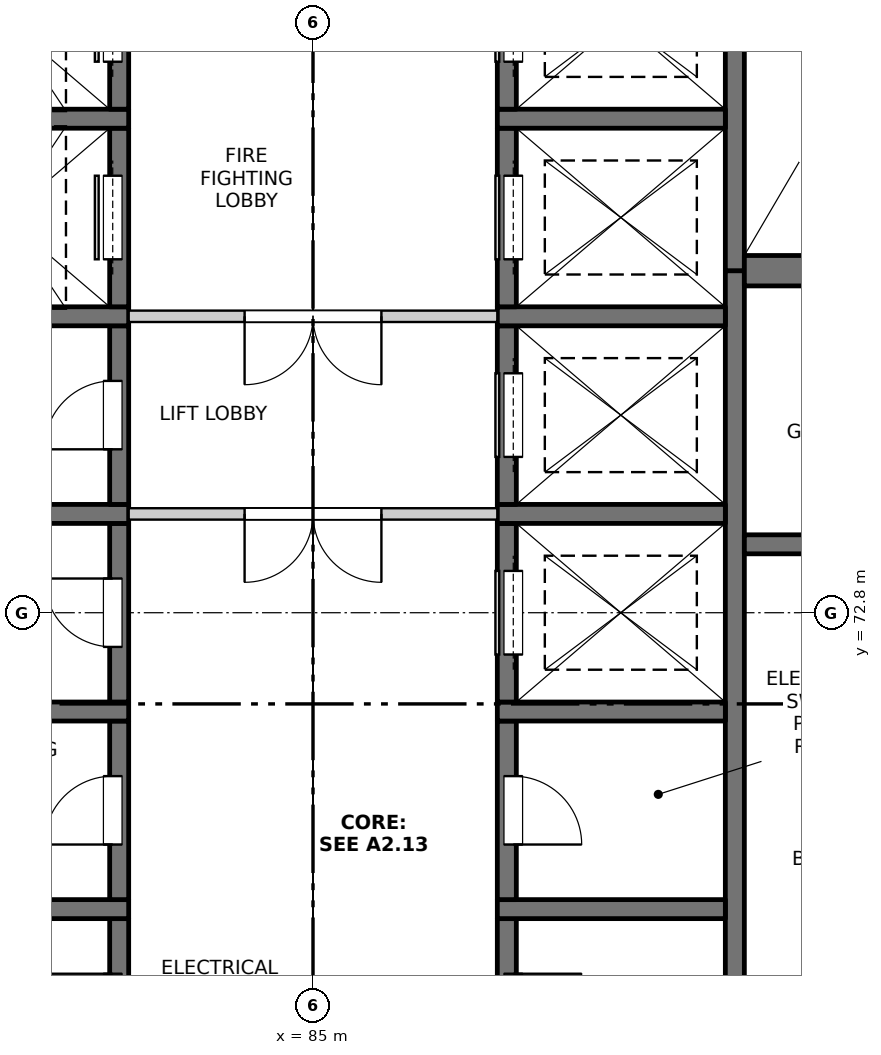
"""IFC4 building model, lengths in metres.
Left out: names, types, materials, properties, quantities, classifications, styles, units other than length and angle.
Written with IfcOpenShell. Run it as: python <this file> out.ifc"""

import sys

from ifc_helpers import new_model, si_unit, direction, frame, frame_2d, origin, place, context, subcontext, project, spatial, rectangle, extrude, element, fill, save


model = new_model("IFC4")
c1 = context("Model", 3, precision=1e-05, world=origin(), true_north=direction((0.0, 1.0)))
c2 = subcontext(c1, "Body", "Model", "MODEL_VIEW")
j1 = project(units=[si_unit("LENGTHUNIT", "METRE"), si_unit("PLANEANGLEUNIT", "RADIAN")], contexts=[c1])
p1 = place(None, origin())
s1 = spatial("IfcSite", under=j1, at=p1, CompositionType="ELEMENT")
p2 = place(p1, origin())
s2 = spatial("IfcBuilding", under=s1, at=p2, CompositionType="ELEMENT")
p3 = place(p2, frame((0.0, 0.0, 266.4)))
s3 = spatial("IfcBuildingStorey", under=s2, at=p3, CompositionType="ELEMENT", Elevation=266.4)
p4 = place(p3, frame((90.55, 61.95, -0.3), z_axis=(0.0, 0.0, 1.0), x_axis=(0.0, 1.0, 0.0)))
e1 = element("IfcWall", 1, at=p4, inside=s3, PredefinedType="SOLIDWALL", context=c2, shape_type="SweptSolid", body=[
    extrude(rectangle(XDim=15.35, YDim=0.25, at=frame_2d((7.675, 0.0))), origin(), (0.0, 0.0, 1.0), 6.0),
])
p5 = place(p3, frame((90.55, 77.3, -0.3), z_axis=(0.0, 0.0, 1.0), x_axis=(0.0, 1.0, 0.0)))
e2 = element("IfcWall", 2, at=p5, inside=s3, PredefinedType="SOLIDWALL", context=c2, shape_type="SweptSolid", body=[
    extrude(rectangle(XDim=7.0, YDim=0.25, at=frame_2d((3.5, 0.0))), origin(), (0.0, 0.0, 1.0), 6.0),
])
p6 = place(p3, frame((82.45, 66.425, -0.3), z_axis=(0.0, 0.0, 1.0), x_axis=(0.0, 1.0, 0.0)))
e3 = element("IfcWall", 3, at=p6, inside=s3, PredefinedType="SOLIDWALL", context=c2, shape_type="SweptSolid", body=[
    extrude(rectangle(XDim=2.35, YDim=0.25, at=frame_2d((1.175, 0.0))), origin(), (0.0, 0.0, 1.0), 6.0),
])
p7 = place(p6, frame((0.725, 0.0, 0.3)))
e4 = element("IfcOpeningElement", 4, at=p7, cuts=e3, PredefinedType="OPENING", context=c2, shape_type="SweptSolid", body=[
    extrude(rectangle(XDim=0.9, YDim=2.1, at=frame_2d((0.45, 1.05))), frame((0.0, 0.135, 0.0), z_axis=(0.0, -1.0, 0.0), x_axis=(1.0, 0.0, 0.0)), (0.0, 0.0, 1.0), 0.27),
])
p8 = place(p3, frame((79.575, 68.9, -0.3), z_axis=(0.0, 0.0, 1.0), x_axis=(1.0, 0.0, 0.0)))
e5 = element("IfcWall", 5, at=p8, inside=s3, PredefinedType="SOLIDWALL", context=c2, shape_type="SweptSolid", body=[
    extrude(rectangle(XDim=3.0, YDim=0.25, at=frame_2d((1.5, 0.0))), origin(), (0.0, 0.0, 1.0), 6.0),
])
p9 = place(p3, frame((82.45, 69.025, -0.3), z_axis=(0.0, 0.0, 1.0), x_axis=(0.0, 1.0, 0.0)))
e6 = element("IfcWall", 6, at=p9, inside=s3, PredefinedType="SOLIDWALL", context=c2, shape_type="SweptSolid", body=[
    extrude(rectangle(XDim=2.35, YDim=0.25, at=frame_2d((1.175, 0.0))), origin(), (0.0, 0.0, 1.0), 6.0),
])
p10 = place(p9, frame((0.725, 0.0, 0.3)))
e7 = element("IfcOpeningElement", 7, at=p10, cuts=e6, PredefinedType="OPENING", context=c2, shape_type="SweptSolid", body=[
    extrude(rectangle(XDim=0.9, YDim=2.1, at=frame_2d((0.45, 1.05))), frame((0.0, 0.135, 0.0), z_axis=(0.0, -1.0, 0.0), x_axis=(1.0, 0.0, 0.0)), (0.0, 0.0, 1.0), 0.27),
])
p11 = place(p3, frame((79.575, 71.5, -0.3), z_axis=(0.0, 0.0, 1.0), x_axis=(1.0, 0.0, 0.0)))
e8 = element("IfcWall", 8, at=p11, inside=s3, PredefinedType="SOLIDWALL", context=c2, shape_type="SweptSolid", body=[
    extrude(rectangle(XDim=3.0, YDim=0.25, at=frame_2d((1.5, 0.0))), origin(), (0.0, 0.0, 1.0), 6.0),
])
p12 = place(p3, frame((82.45, 71.625, -0.3), z_axis=(0.0, 0.0, 1.0), x_axis=(0.0, 1.0, 0.0)))
e9 = element("IfcWall", 9, at=p12, inside=s3, PredefinedType="SOLIDWALL", context=c2, shape_type="SweptSolid", body=[
    extrude(rectangle(XDim=2.35, YDim=0.25, at=frame_2d((1.175, 0.0))), origin(), (0.0, 0.0, 1.0), 6.0),
])
p13 = place(p12, frame((0.725, 0.0, 0.3)))
e10 = element("IfcOpeningElement", 10, at=p13, cuts=e9, PredefinedType="OPENING", context=c2, shape_type="SweptSolid", body=[
    extrude(rectangle(XDim=0.9, YDim=2.1, at=frame_2d((0.45, 1.05))), frame((0.0, 0.135, 0.0), z_axis=(0.0, -1.0, 0.0), x_axis=(1.0, 0.0, 0.0)), (0.0, 0.0, 1.0), 0.27),
])
p14 = place(p3, frame((79.575, 74.1, -0.3), z_axis=(0.0, 0.0, 1.0), x_axis=(1.0, 0.0, 0.0)))
e11 = element("IfcWall", 11, at=p14, inside=s3, PredefinedType="SOLIDWALL", context=c2, shape_type="SweptSolid", body=[
    extrude(rectangle(XDim=3.0, YDim=0.25, at=frame_2d((1.5, 0.0))), origin(), (0.0, 0.0, 1.0), 6.0),
])
p15 = place(p3, frame((82.45, 74.225, -0.3), z_axis=(0.0, 0.0, 1.0), x_axis=(0.0, 1.0, 0.0)))
e12 = element("IfcWall", 12, at=p15, inside=s3, PredefinedType="SOLIDWALL", context=c2, shape_type="SweptSolid", body=[
    extrude(rectangle(XDim=2.35, YDim=0.25, at=frame_2d((1.175, 0.0))), origin(), (0.0, 0.0, 1.0), 6.0),
])
p16 = place(p15, frame((0.725, 0.0, 0.3)))
e13 = element("IfcOpeningElement", 13, at=p16, cuts=e12, PredefinedType="OPENING", context=c2, shape_type="SweptSolid", body=[
    extrude(rectangle(XDim=0.9, YDim=2.1, at=frame_2d((0.45, 1.05))), frame((0.0, 0.135, 0.0), z_axis=(0.0, -1.0, 0.0), x_axis=(1.0, 0.0, 0.0)), (0.0, 0.0, 1.0), 0.27),
])
p17 = place(p3, frame((79.575, 76.7, -0.3), z_axis=(0.0, 0.0, 1.0), x_axis=(1.0, 0.0, 0.0)))
e14 = element("IfcWall", 14, at=p17, inside=s3, PredefinedType="SOLIDWALL", context=c2, shape_type="SweptSolid", body=[
    extrude(rectangle(XDim=3.0, YDim=0.25, at=frame_2d((1.5, 0.0))), origin(), (0.0, 0.0, 1.0), 6.0),
])
p18 = place(p3, frame((82.45, 76.825, -0.3), z_axis=(0.0, 0.0, 1.0), x_axis=(0.0, 1.0, 0.0)))
e15 = element("IfcWall", 15, at=p18, inside=s3, PredefinedType="SOLIDWALL", context=c2, shape_type="SweptSolid", body=[
    extrude(rectangle(XDim=2.35, YDim=0.25, at=frame_2d((1.175, 0.0))), origin(), (0.0, 0.0, 1.0), 6.0),
])
p19 = place(p18, frame((0.625, 0.0, 0.3)))
e16 = element("IfcOpeningElement", 16, at=p19, cuts=e15, PredefinedType="OPENING", context=c2, shape_type="SweptSolid", body=[
    extrude(rectangle(XDim=1.1, YDim=2.1, at=frame_2d((0.55, 1.05))), frame((0.0, 0.135, 0.0), z_axis=(0.0, -1.0, 0.0), x_axis=(1.0, 0.0, 0.0)), (0.0, 0.0, 1.0), 0.27),
])
p20 = place(p3, frame((79.575, 79.3, -0.3), z_axis=(0.0, 0.0, 1.0), x_axis=(1.0, 0.0, 0.0)))
e17 = element("IfcWall", 17, at=p20, inside=s3, PredefinedType="SOLIDWALL", context=c2, shape_type="SweptSolid", body=[
    extrude(rectangle(XDim=3.0, YDim=0.25, at=frame_2d((1.5, 0.0))), origin(), (0.0, 0.0, 1.0), 6.0),
])
p21 = place(p3, frame((82.45, 79.425, -0.3), z_axis=(0.0, 0.0, 1.0), x_axis=(0.0, 1.0, 0.0)))
e18 = element("IfcWall", 18, at=p21, inside=s3, PredefinedType="SOLIDWALL", context=c2, shape_type="SweptSolid", body=[
    extrude(rectangle(XDim=2.35, YDim=0.25, at=frame_2d((1.175, 0.0))), origin(), (0.0, 0.0, 1.0), 6.0),
])
p22 = place(p21, frame((0.625, 0.0, 0.3)))
e19 = element("IfcOpeningElement", 19, at=p22, cuts=e18, PredefinedType="OPENING", context=c2, shape_type="SweptSolid", body=[
    extrude(rectangle(XDim=1.1, YDim=2.1, at=frame_2d((0.55, 1.05))), frame((0.0, 0.135, 0.0), z_axis=(0.0, -1.0, 0.0), x_axis=(1.0, 0.0, 0.0)), (0.0, 0.0, 1.0), 0.27),
])
p23 = place(p3, frame((87.55, 66.425, -0.3), z_axis=(0.0, 0.0, 1.0), x_axis=(0.0, 1.0, 0.0)))
e20 = element("IfcWall", 20, at=p23, inside=s3, PredefinedType="SOLIDWALL", context=c2, shape_type="SweptSolid", body=[
    extrude(rectangle(XDim=2.35, YDim=0.25, at=frame_2d((1.175, 0.0))), origin(), (0.0, 0.0, 1.0), 6.0),
])
p24 = place(p23, frame((0.725, 0.0, 0.3)))
e21 = element("IfcOpeningElement", 21, at=p24, cuts=e20, PredefinedType="OPENING", context=c2, shape_type="SweptSolid", body=[
    extrude(rectangle(XDim=0.9, YDim=2.1, at=frame_2d((0.45, 1.05))), frame((0.0, 0.135, 0.0), z_axis=(0.0, -1.0, 0.0), x_axis=(1.0, 0.0, 0.0)), (0.0, 0.0, 1.0), 0.27),
])
p25 = place(p3, frame((87.425, 68.9, -0.3), z_axis=(0.0, 0.0, 1.0), x_axis=(1.0, 0.0, 0.0)))
e22 = element("IfcWall", 22, at=p25, inside=s3, PredefinedType="SOLIDWALL", context=c2, shape_type="SweptSolid", body=[
    extrude(rectangle(XDim=3.0, YDim=0.25, at=frame_2d((1.5, 0.0))), origin(), (0.0, 0.0, 1.0), 6.0),
])
p26 = place(p3, frame((87.55, 69.025, -0.3), z_axis=(0.0, 0.0, 1.0), x_axis=(0.0, 1.0, 0.0)))
e23 = element("IfcWall", 23, at=p26, inside=s3, PredefinedType="SOLIDWALL", context=c2, shape_type="SweptSolid", body=[
    extrude(rectangle(XDim=2.35, YDim=0.25, at=frame_2d((1.175, 0.0))), origin(), (0.0, 0.0, 1.0), 6.0),
])
p27 = place(p26, frame((0.725, 0.0, 0.3)))
e24 = element("IfcOpeningElement", 24, at=p27, cuts=e23, PredefinedType="OPENING", context=c2, shape_type="SweptSolid", body=[
    extrude(rectangle(XDim=0.9, YDim=2.1, at=frame_2d((0.45, 1.05))), frame((0.0, 0.135, 0.0), z_axis=(0.0, -1.0, 0.0), x_axis=(1.0, 0.0, 0.0)), (0.0, 0.0, 1.0), 0.27),
])
p28 = place(p3, frame((87.425, 71.5, -0.3), z_axis=(0.0, 0.0, 1.0), x_axis=(1.0, 0.0, 0.0)))
e25 = element("IfcWall", 25, at=p28, inside=s3, PredefinedType="SOLIDWALL", context=c2, shape_type="SweptSolid", body=[
    extrude(rectangle(XDim=3.0, YDim=0.25, at=frame_2d((1.5, 0.0))), origin(), (0.0, 0.0, 1.0), 6.0),
])
p29 = place(p3, frame((87.55, 71.625, -0.3), z_axis=(0.0, 0.0, 1.0), x_axis=(0.0, 1.0, 0.0)))
e26 = element("IfcWall", 26, at=p29, inside=s3, PredefinedType="SOLIDWALL", context=c2, shape_type="SweptSolid", body=[
    extrude(rectangle(XDim=2.35, YDim=0.25, at=frame_2d((1.175, 0.0))), origin(), (0.0, 0.0, 1.0), 6.0),
])
p30 = place(p29, frame((0.625, 0.0, 0.3)))
e27 = element("IfcOpeningElement", 27, at=p30, cuts=e26, PredefinedType="OPENING", context=c2, shape_type="SweptSolid", body=[
    extrude(rectangle(XDim=1.1, YDim=2.1, at=frame_2d((0.55, 1.05))), frame((0.0, 0.135, 0.0), z_axis=(0.0, -1.0, 0.0), x_axis=(1.0, 0.0, 0.0)), (0.0, 0.0, 1.0), 0.27),
])
p31 = place(p3, frame((87.425, 74.1, -0.3), z_axis=(0.0, 0.0, 1.0), x_axis=(1.0, 0.0, 0.0)))
e28 = element("IfcWall", 28, at=p31, inside=s3, PredefinedType="SOLIDWALL", context=c2, shape_type="SweptSolid", body=[
    extrude(rectangle(XDim=3.0, YDim=0.25, at=frame_2d((1.5, 0.0))), origin(), (0.0, 0.0, 1.0), 6.0),
])
p32 = place(p3, frame((87.55, 74.225, -0.3), z_axis=(0.0, 0.0, 1.0), x_axis=(0.0, 1.0, 0.0)))
e29 = element("IfcWall", 29, at=p32, inside=s3, PredefinedType="SOLIDWALL", context=c2, shape_type="SweptSolid", body=[
    extrude(rectangle(XDim=2.35, YDim=0.25, at=frame_2d((1.175, 0.0))), origin(), (0.0, 0.0, 1.0), 6.0),
])
p33 = place(p32, frame((0.625, 0.0, 0.3)))
e30 = element("IfcOpeningElement", 30, at=p33, cuts=e29, PredefinedType="OPENING", context=c2, shape_type="SweptSolid", body=[
    extrude(rectangle(XDim=1.1, YDim=2.1, at=frame_2d((0.55, 1.05))), frame((0.0, 0.135, 0.0), z_axis=(0.0, -1.0, 0.0), x_axis=(1.0, 0.0, 0.0)), (0.0, 0.0, 1.0), 0.27),
])
p34 = place(p3, frame((87.425, 76.7, -0.3), z_axis=(0.0, 0.0, 1.0), x_axis=(1.0, 0.0, 0.0)))
e31 = element("IfcWall", 31, at=p34, inside=s3, PredefinedType="SOLIDWALL", context=c2, shape_type="SweptSolid", body=[
    extrude(rectangle(XDim=3.0, YDim=0.25, at=frame_2d((1.5, 0.0))), origin(), (0.0, 0.0, 1.0), 6.0),
])
p35 = place(p3, frame((87.55, 76.825, -0.3), z_axis=(0.0, 0.0, 1.0), x_axis=(0.0, 1.0, 0.0)))
e32 = element("IfcWall", 32, at=p35, inside=s3, PredefinedType="SOLIDWALL", context=c2, shape_type="SweptSolid", body=[
    extrude(rectangle(XDim=2.35, YDim=0.25, at=frame_2d((1.175, 0.0))), origin(), (0.0, 0.0, 1.0), 6.0),
])
p36 = place(p35, frame((0.625, 0.0, 0.3)))
e33 = element("IfcOpeningElement", 33, at=p36, cuts=e32, PredefinedType="OPENING", context=c2, shape_type="SweptSolid", body=[
    extrude(rectangle(XDim=1.1, YDim=2.1, at=frame_2d((0.55, 1.05))), frame((0.0, 0.135, 0.0), z_axis=(0.0, -1.0, 0.0), x_axis=(1.0, 0.0, 0.0)), (0.0, 0.0, 1.0), 0.27),
])
p37 = place(p3, frame((87.425, 79.3, -0.3), z_axis=(0.0, 0.0, 1.0), x_axis=(1.0, 0.0, 0.0)))
e34 = element("IfcWall", 34, at=p37, inside=s3, PredefinedType="SOLIDWALL", context=c2, shape_type="SweptSolid", body=[
    extrude(rectangle(XDim=3.0, YDim=0.25, at=frame_2d((1.5, 0.0))), origin(), (0.0, 0.0, 1.0), 6.0),
])
p38 = place(p3, frame((87.55, 79.425, -0.3), z_axis=(0.0, 0.0, 1.0), x_axis=(0.0, 1.0, 0.0)))
e35 = element("IfcWall", 35, at=p38, inside=s3, PredefinedType="SOLIDWALL", context=c2, shape_type="SweptSolid", body=[
    extrude(rectangle(XDim=2.35, YDim=0.25, at=frame_2d((1.175, 0.0))), origin(), (0.0, 0.0, 1.0), 6.0),
])
p39 = place(p38, frame((0.625, 0.0, 0.3)))
e36 = element("IfcOpeningElement", 36, at=p39, cuts=e35, PredefinedType="OPENING", context=c2, shape_type="SweptSolid", body=[
    extrude(rectangle(XDim=1.1, YDim=2.1, at=frame_2d((0.55, 1.05))), frame((0.0, 0.135, 0.0), z_axis=(0.0, -1.0, 0.0), x_axis=(1.0, 0.0, 0.0)), (0.0, 0.0, 1.0), 0.27),
])
p40 = place(p3, frame((90.675, 73.7, -0.3), z_axis=(0.0, 0.0, 1.0), x_axis=(1.0, 0.0, 0.0)))
e37 = element("IfcWall", 37, at=p40, inside=s3, PredefinedType="SOLIDWALL", context=c2, shape_type="SweptSolid", body=[
    extrude(rectangle(XDim=3.875, YDim=0.25, at=frame_2d((1.938, 0.0))), origin(), (0.0, 0.0, 1.0), 6.0),
])
p41 = place(p3, frame((90.675, 77.3, -0.3), z_axis=(0.0, 0.0, 1.0), x_axis=(1.0, 0.0, 0.0)))
e38 = element("IfcWall", 38, at=p41, inside=s3, PredefinedType="SOLIDWALL", context=c2, shape_type="SweptSolid", body=[
    extrude(rectangle(XDim=3.875, YDim=0.4, at=frame_2d((1.938, 0.0))), origin(), (0.0, 0.0, 1.0), 6.0),
])
p42 = place(p3, frame((82.575, 74.1, 0.0), z_axis=(0.0, 0.0, 1.0), x_axis=(1.0, 0.0, 0.0)))
e39 = element("IfcWall", 39, at=p42, inside=s3, PredefinedType="PARTITIONING", context=c2, shape_type="SweptSolid", body=[
    extrude(rectangle(XDim=4.85, YDim=0.15, at=frame_2d((2.425, 0.0))), origin(), (0.0, 0.0, 1.0), 5.7),
])
p43 = place(p42, frame((1.525, 0.0, 0.0)))
e40 = element("IfcOpeningElement", 40, at=p43, cuts=e39, PredefinedType="OPENING", context=c2, shape_type="SweptSolid", body=[
    extrude(rectangle(XDim=1.8, YDim=2.1, at=frame_2d((0.9, 1.05))), frame((0.0, 0.085, 0.0), z_axis=(0.0, -1.0, 0.0), x_axis=(1.0, 0.0, 0.0)), (0.0, 0.0, 1.0), 0.17),
])
p44 = place(p3, frame((82.575, 76.7, 0.0), z_axis=(0.0, 0.0, 1.0), x_axis=(1.0, 0.0, 0.0)))
e41 = element("IfcWall", 41, at=p44, inside=s3, PredefinedType="PARTITIONING", context=c2, shape_type="SweptSolid", body=[
    extrude(rectangle(XDim=4.85, YDim=0.15, at=frame_2d((2.425, 0.0))), origin(), (0.0, 0.0, 1.0), 5.7),
])
p45 = place(p44, frame((1.525, 0.0, 0.0)))
e42 = element("IfcOpeningElement", 42, at=p45, cuts=e41, PredefinedType="OPENING", context=c2, shape_type="SweptSolid", body=[
    extrude(rectangle(XDim=1.8, YDim=2.1, at=frame_2d((0.9, 1.05))), frame((0.0, 0.085, 0.0), z_axis=(0.0, -1.0, 0.0), x_axis=(1.0, 0.0, 0.0)), (0.0, 0.0, 1.0), 0.17),
])
p46 = place(p7, origin())
e43 = element("IfcDoor", 43, at=p46, inside=s3, OperationType="SINGLE_SWING_RIGHT", PredefinedType="DOOR", context=c2, shape_type="SweptSolid", body=[
    extrude(rectangle(XDim=0.9, YDim=2.1, at=frame_2d((0.45, 1.05))), frame((0.0, 0.11, 0.0), z_axis=(0.0, -1.0, 0.0), x_axis=(1.0, 0.0, 0.0)), (0.0, 0.0, 1.0), 0.05),
])
fill(e4, e43)
p47 = place(p24, origin())
e44 = element("IfcDoor", 44, at=p47, inside=s3, OperationType="SINGLE_SWING_LEFT", PredefinedType="DOOR", context=c2, shape_type="SweptSolid", body=[
    extrude(rectangle(XDim=0.9, YDim=2.1, at=frame_2d((0.45, 1.05))), frame((0.0, -0.06, 0.0), z_axis=(0.0, -1.0, 0.0), x_axis=(1.0, 0.0, 0.0)), (0.0, 0.0, 1.0), 0.05),
])
fill(e21, e44)
p48 = place(p10, origin())
e45 = element("IfcDoor", 45, at=p48, inside=s3, OperationType="SINGLE_SWING_LEFT", PredefinedType="DOOR", context=c2, shape_type="SweptSolid", body=[
    extrude(rectangle(XDim=0.9, YDim=2.1, at=frame_2d((0.45, 1.05))), frame((0.0, 0.11, 0.0), z_axis=(0.0, -1.0, 0.0), x_axis=(1.0, 0.0, 0.0)), (0.0, 0.0, 1.0), 0.05),
])
fill(e7, e45)
p49 = place(p27, origin())
e46 = element("IfcDoor", 46, at=p49, inside=s3, OperationType="SINGLE_SWING_RIGHT", PredefinedType="DOOR", context=c2, shape_type="SweptSolid", body=[
    extrude(rectangle(XDim=0.9, YDim=2.1, at=frame_2d((0.45, 1.05))), frame((0.0, -0.06, 0.0), z_axis=(0.0, -1.0, 0.0), x_axis=(1.0, 0.0, 0.0)), (0.0, 0.0, 1.0), 0.05),
])
fill(e24, e46)
p50 = place(p13, origin())
e47 = element("IfcDoor", 47, at=p50, inside=s3, OperationType="SINGLE_SWING_RIGHT", PredefinedType="DOOR", context=c2, shape_type="SweptSolid", body=[
    extrude(rectangle(XDim=0.9, YDim=2.1, at=frame_2d((0.45, 1.05))), frame((0.0, 0.11, 0.0), z_axis=(0.0, -1.0, 0.0), x_axis=(1.0, 0.0, 0.0)), (0.0, 0.0, 1.0), 0.05),
])
fill(e10, e47)
p51 = place(p30, origin())
e48 = element("IfcDoor", 48, at=p51, inside=s3, OperationType="SLIDING_TO_LEFT", PredefinedType="DOOR", context=c2, shape_type="SweptSolid", body=[
    extrude(rectangle(XDim=1.1, YDim=2.1, at=frame_2d((0.55, 1.05))), frame((0.0, -0.06, 0.0), z_axis=(0.0, -1.0, 0.0), x_axis=(1.0, 0.0, 0.0)), (0.0, 0.0, 1.0), 0.05),
])
fill(e27, e48)
p52 = place(p43, origin())
e49 = element("IfcDoor", 49, at=p52, inside=s3, OperationType="DOUBLE_DOOR_SINGLE_SWING", PredefinedType="DOOR", context=c2, shape_type="SweptSolid", body=[
    extrude(rectangle(XDim=1.8, YDim=2.1, at=frame_2d((0.9, 1.05))), frame((0.0, 0.025, 0.0), z_axis=(0.0, -1.0, 0.0), x_axis=(1.0, 0.0, 0.0)), (0.0, 0.0, 1.0), 0.05),
])
fill(e40, e49)
p53 = place(p16, origin())
e50 = element("IfcDoor", 50, at=p53, inside=s3, OperationType="SINGLE_SWING_LEFT", PredefinedType="DOOR", context=c2, shape_type="SweptSolid", body=[
    extrude(rectangle(XDim=0.9, YDim=2.1, at=frame_2d((0.45, 1.05))), frame((0.0, 0.11, 0.0), z_axis=(0.0, -1.0, 0.0), x_axis=(1.0, 0.0, 0.0)), (0.0, 0.0, 1.0), 0.05),
])
fill(e13, e50)
p54 = place(p33, origin())
e51 = element("IfcDoor", 51, at=p54, inside=s3, OperationType="SLIDING_TO_LEFT", PredefinedType="DOOR", context=c2, shape_type="SweptSolid", body=[
    extrude(rectangle(XDim=1.1, YDim=2.1, at=frame_2d((0.55, 1.05))), frame((0.0, -0.06, 0.0), z_axis=(0.0, -1.0, 0.0), x_axis=(1.0, 0.0, 0.0)), (0.0, 0.0, 1.0), 0.05),
])
fill(e30, e51)
p55 = place(p45, origin())
e52 = element("IfcDoor", 52, at=p55, inside=s3, OperationType="DOUBLE_DOOR_SINGLE_SWING", PredefinedType="DOOR", context=c2, shape_type="SweptSolid", body=[
    extrude(rectangle(XDim=1.8, YDim=2.1, at=frame_2d((0.9, 1.05))), frame((0.0, 0.025, 0.0), z_axis=(0.0, -1.0, 0.0), x_axis=(1.0, 0.0, 0.0)), (0.0, 0.0, 1.0), 0.05),
])
fill(e42, e52)
p56 = place(p19, origin())
e53 = element("IfcDoor", 53, at=p56, inside=s3, OperationType="SLIDING_TO_LEFT", PredefinedType="DOOR", context=c2, shape_type="SweptSolid", body=[
    extrude(rectangle(XDim=1.1, YDim=2.1, at=frame_2d((0.55, 1.05))), frame((0.0, 0.11, 0.0), z_axis=(0.0, -1.0, 0.0), x_axis=(1.0, 0.0, 0.0)), (0.0, 0.0, 1.0), 0.05),
])
fill(e16, e53)
p57 = place(p36, origin())
e54 = element("IfcDoor", 54, at=p57, inside=s3, OperationType="SLIDING_TO_LEFT", PredefinedType="DOOR", context=c2, shape_type="SweptSolid", body=[
    extrude(rectangle(XDim=1.1, YDim=2.1, at=frame_2d((0.55, 1.05))), frame((0.0, -0.06, 0.0), z_axis=(0.0, -1.0, 0.0), x_axis=(1.0, 0.0, 0.0)), (0.0, 0.0, 1.0), 0.05),
])
fill(e33, e54)
p58 = place(p22, origin())
e55 = element("IfcDoor", 55, at=p58, inside=s3, OperationType="SLIDING_TO_LEFT", PredefinedType="DOOR", context=c2, shape_type="SweptSolid", body=[
    extrude(rectangle(XDim=1.1, YDim=2.1, at=frame_2d((0.55, 1.05))), frame((0.0, 0.11, 0.0), z_axis=(0.0, -1.0, 0.0), x_axis=(1.0, 0.0, 0.0)), (0.0, 0.0, 1.0), 0.05),
])
fill(e19, e55)
p59 = place(p39, origin())
e56 = element("IfcDoor", 56, at=p59, inside=s3, OperationType="SLIDING_TO_RIGHT", PredefinedType="DOOR", context=c2, shape_type="SweptSolid", body=[
    extrude(rectangle(XDim=1.1, YDim=2.1, at=frame_2d((0.55, 1.05))), frame((0.0, -0.06, 0.0), z_axis=(0.0, -1.0, 0.0), x_axis=(1.0, 0.0, 0.0)), (0.0, 0.0, 1.0), 0.05),
])
fill(e36, e56)
save(model, sys.argv[1])
